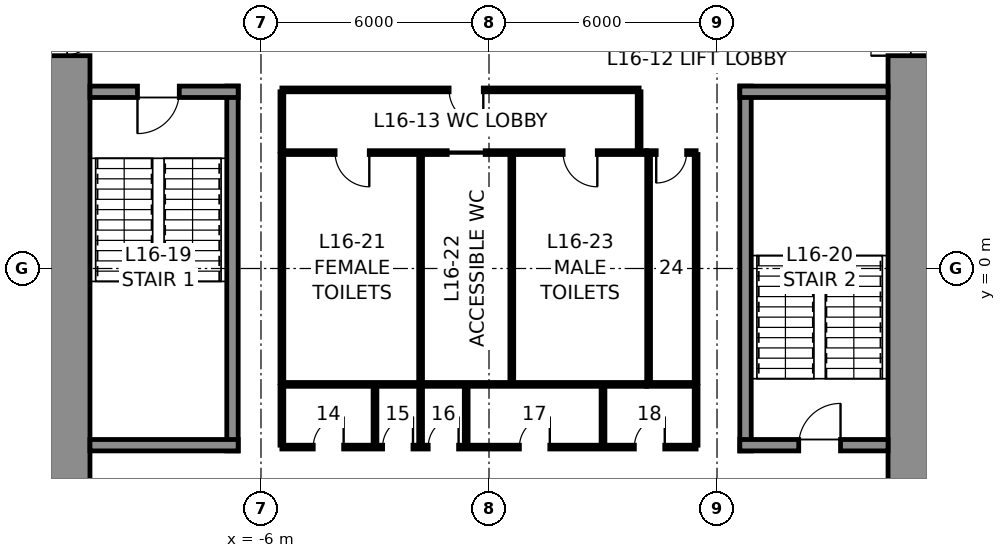
"""IFC4 building model, lengths in metres.
Left out: names, types, materials, properties, quantities, classifications, styles, units other than length and angle.
Written with IfcOpenShell. Run it as: python <this file> out.ifc"""

import sys

from ifc_helpers import new_model, si_unit, direction, frame, frame_2d, origin, place, context, subcontext, project, spatial, rectangle, extrude, element, fill, save


model = new_model("IFC4")
c1 = context("Model", 3, precision=1e-05, world=origin(), true_north=direction((0.0, 1.0)))
c2 = subcontext(c1, "Body", "Model", "MODEL_VIEW")
j1 = project(units=[si_unit("LENGTHUNIT", "METRE"), si_unit("PLANEANGLEUNIT", "RADIAN")], contexts=[c1])
p1 = place(None, origin())
s1 = spatial("IfcSite", under=j1, at=p1, CompositionType="ELEMENT")
p2 = place(p1, origin())
s2 = spatial("IfcBuilding", under=s1, at=p2, CompositionType="ELEMENT")
p3 = place(p2, frame((0.0, 0.0, 86.0)))
s3 = spatial("IfcBuildingStorey", under=s2, at=p3, CompositionType="ELEMENT", Elevation=86.0)
p4 = place(p3, frame((11.25, 10.5, 0.0), z_axis=(0.0, 0.0, 1.0), x_axis=(0.0, -1.0, 0.0)))
e1 = element("IfcWall", 1, at=p4, inside=s3, PredefinedType="SHEAR", context=c2, shape_type="SweptSolid", body=[
    extrude(rectangle(XDim=21.0, YDim=1.5, at=frame_2d((10.5, 0.0))), origin(), (0.0, 0.0, 1.0), 4.6),
])
p5 = place(p4, frame((3.7, 0.0, 0.0)))
e2 = element("IfcOpeningElement", 2, at=p5, cuts=e1, PredefinedType="OPENING", context=c2, shape_type="SweptSolid", body=[
    extrude(rectangle(XDim=1.2, YDim=2.3, at=frame_2d((0.6, 1.15))), frame((0.0, 0.76, 0.0), z_axis=(0.0, -1.0, 0.0), x_axis=(1.0, 0.0, 0.0)), (0.0, 0.0, 1.0), 1.52),
])
p6 = place(p4, frame((16.1, 0.0, 0.0)))
e3 = element("IfcOpeningElement", 3, at=p6, cuts=e1, PredefinedType="OPENING", context=c2, shape_type="SweptSolid", body=[
    extrude(rectangle(XDim=1.2, YDim=2.3, at=frame_2d((0.6, 1.15))), frame((0.0, 0.76, 0.0), z_axis=(0.0, -1.0, 0.0), x_axis=(1.0, 0.0, 0.0)), (0.0, 0.0, 1.0), 1.52),
])
p7 = place(p3, frame((-11.25, -10.5, 0.0), z_axis=(0.0, 0.0, 1.0), x_axis=(0.0, 1.0, 0.0)))
e4 = element("IfcWall", 4, at=p7, inside=s3, PredefinedType="SHEAR", context=c2, shape_type="SweptSolid", body=[
    extrude(rectangle(XDim=21.0, YDim=1.5, at=frame_2d((10.5, 0.0))), origin(), (0.0, 0.0, 1.0), 4.6),
])
p8 = place(p7, frame((16.1, 0.0, 0.0)))
e5 = element("IfcOpeningElement", 5, at=p8, cuts=e4, PredefinedType="OPENING", context=c2, shape_type="SweptSolid", body=[
    extrude(rectangle(XDim=1.2, YDim=2.3, at=frame_2d((0.6, 1.15))), frame((0.0, 0.76, 0.0), z_axis=(0.0, -1.0, 0.0), x_axis=(1.0, 0.0, 0.0)), (0.0, 0.0, 1.0), 1.52),
])
p9 = place(p7, frame((3.7, 0.0, 0.0)))
e6 = element("IfcOpeningElement", 6, at=p9, cuts=e4, PredefinedType="OPENING", context=c2, shape_type="SweptSolid", body=[
    extrude(rectangle(XDim=1.2, YDim=2.3, at=frame_2d((0.6, 1.15))), frame((0.0, 0.76, 0.0), z_axis=(0.0, -1.0, 0.0), x_axis=(1.0, 0.0, 0.0)), (0.0, 0.0, 1.0), 1.52),
])
p10 = place(p3, frame((-6.75, -4.8, 0.0), z_axis=(0.0, 0.0, 1.0), x_axis=(0.0, 1.0, 0.0)))
e7 = element("IfcWall", 7, at=p10, inside=s3, PredefinedType="SOLIDWALL", context=c2, shape_type="SweptSolid", body=[
    extrude(rectangle(XDim=9.6, YDim=0.3, at=frame_2d((4.8, 0.0))), origin(), (0.0, 0.0, 1.0), 4.35),
])
p11 = place(p3, frame((-10.5, 4.65, 0.0), z_axis=(0.0, 0.0, 1.0), x_axis=(1.0, 0.0, 0.0)))
e8 = element("IfcWall", 8, at=p11, inside=s3, PredefinedType="SOLIDWALL", context=c2, shape_type="SweptSolid", body=[
    extrude(rectangle(XDim=3.9, YDim=0.3, at=frame_2d((1.95, 0.0))), origin(), (0.0, 0.0, 1.0), 4.35),
])
p12 = place(p11, frame((1.25, 0.0, 0.0)))
e9 = element("IfcOpeningElement", 9, at=p12, cuts=e8, PredefinedType="OPENING", context=c2, shape_type="SweptSolid", body=[
    extrude(rectangle(XDim=1.1, YDim=2.3, at=frame_2d((0.55, 1.15))), frame((0.0, 0.16, 0.0), z_axis=(0.0, -1.0, 0.0), x_axis=(1.0, 0.0, 0.0)), (0.0, 0.0, 1.0), 0.32),
])
p13 = place(p3, frame((-6.6, -4.65, 0.0), z_axis=(0.0, 0.0, 1.0), x_axis=(-1.0, 0.0, 0.0)))
e10 = element("IfcWall", 10, at=p13, inside=s3, PredefinedType="SOLIDWALL", context=c2, shape_type="SweptSolid", body=[
    extrude(rectangle(XDim=3.9, YDim=0.3, at=frame_2d((1.95, 0.0))), origin(), (0.0, 0.0, 1.0), 4.35),
])
p14 = place(p3, frame((6.75, -4.8, 0.0), z_axis=(0.0, 0.0, 1.0), x_axis=(0.0, 1.0, 0.0)))
e11 = element("IfcWall", 11, at=p14, inside=s3, PredefinedType="SOLIDWALL", context=c2, shape_type="SweptSolid", body=[
    extrude(rectangle(XDim=9.6, YDim=0.3, at=frame_2d((4.8, 0.0))), origin(), (0.0, 0.0, 1.0), 4.35),
])
p15 = place(p3, frame((6.6, 4.65, 0.0), z_axis=(0.0, 0.0, 1.0), x_axis=(1.0, 0.0, 0.0)))
e12 = element("IfcWall", 12, at=p15, inside=s3, PredefinedType="SOLIDWALL", context=c2, shape_type="SweptSolid", body=[
    extrude(rectangle(XDim=3.9, YDim=0.3, at=frame_2d((1.95, 0.0))), origin(), (0.0, 0.0, 1.0), 4.35),
])
p16 = place(p3, frame((10.5, -4.65, 0.0), z_axis=(0.0, 0.0, 1.0), x_axis=(-1.0, 0.0, 0.0)))
e13 = element("IfcWall", 13, at=p16, inside=s3, PredefinedType="SOLIDWALL", context=c2, shape_type="SweptSolid", body=[
    extrude(rectangle(XDim=3.9, YDim=0.3, at=frame_2d((1.95, 0.0))), origin(), (0.0, 0.0, 1.0), 4.35),
])
p17 = place(p16, frame((1.25, 0.0, 0.0)))
e14 = element("IfcOpeningElement", 14, at=p17, cuts=e13, PredefinedType="OPENING", context=c2, shape_type="SweptSolid", body=[
    extrude(rectangle(XDim=1.1, YDim=2.3, at=frame_2d((0.55, 1.15))), frame((0.0, 0.16, 0.0), z_axis=(0.0, -1.0, 0.0), x_axis=(1.0, 0.0, 0.0)), (0.0, 0.0, 1.0), 0.32),
])
p18 = place(p3, frame((-5.45, 3.05, 0.0), z_axis=(0.0, 0.0, 1.0), x_axis=(1.0, 0.0, 0.0)))
e15 = element("IfcWall", 15, at=p18, inside=s3, PredefinedType="PARTITIONING", context=c2, shape_type="SweptSolid", body=[
    extrude(rectangle(XDim=9.6, YDim=0.1, at=frame_2d((4.8, 0.0))), origin(), (0.0, 0.0, 1.0), 4.35),
])
p19 = place(p18, frame((1.4, 0.0, 0.0)))
e16 = element("IfcOpeningElement", 16, at=p19, cuts=e15, PredefinedType="OPENING", context=c2, shape_type="SweptSolid", body=[
    extrude(rectangle(XDim=0.9, YDim=2.3, at=frame_2d((0.45, 1.15))), frame((0.0, 0.06, 0.0), z_axis=(0.0, -1.0, 0.0), x_axis=(1.0, 0.0, 0.0)), (0.0, 0.0, 1.0), 0.12),
])
p20 = place(p18, frame((4.35, 0.0, 0.0)))
e17 = element("IfcOpeningElement", 17, at=p20, cuts=e15, PredefinedType="OPENING", context=c2, shape_type="SweptSolid", body=[
    extrude(rectangle(XDim=1.0, YDim=2.3, at=frame_2d((0.5, 1.15))), frame((0.0, 0.06, 0.0), z_axis=(0.0, -1.0, 0.0), x_axis=(1.0, 0.0, 0.0)), (0.0, 0.0, 1.0), 0.12),
])
p21 = place(p18, frame((7.4, 0.0, 0.0)))
e18 = element("IfcOpeningElement", 18, at=p21, cuts=e15, PredefinedType="OPENING", context=c2, shape_type="SweptSolid", body=[
    extrude(rectangle(XDim=0.9, YDim=2.3, at=frame_2d((0.45, 1.15))), frame((0.0, 0.06, 0.0), z_axis=(0.0, -1.0, 0.0), x_axis=(1.0, 0.0, 0.0)), (0.0, 0.0, 1.0), 0.12),
])
p22 = place(p3, frame((4.15, 3.05, 0.0), z_axis=(0.0, 0.0, 1.0), x_axis=(1.0, 0.0, 0.0)))
e19 = element("IfcWall", 19, at=p22, inside=s3, PredefinedType="PARTITIONING", context=c2, shape_type="SweptSolid", body=[
    extrude(rectangle(XDim=1.3, YDim=0.1, at=frame_2d((0.65, 0.0))), origin(), (0.0, 0.0, 1.0), 4.35),
])
p23 = place(p22, frame((0.25, 0.0, 0.0)))
e20 = element("IfcOpeningElement", 20, at=p23, cuts=e19, PredefinedType="OPENING", context=c2, shape_type="SweptSolid", body=[
    extrude(rectangle(XDim=0.8, YDim=2.3, at=frame_2d((0.4, 1.15))), frame((0.0, 0.06, 0.0), z_axis=(0.0, -1.0, 0.0), x_axis=(1.0, 0.0, 0.0)), (0.0, 0.0, 1.0), 0.12),
])
p24 = place(p3, frame((4.15, -3.05, 0.0), z_axis=(0.0, 0.0, 1.0), x_axis=(-1.0, 0.0, 0.0)))
e21 = element("IfcWall", 21, at=p24, inside=s3, PredefinedType="PARTITIONING", context=c2, shape_type="SweptSolid", body=[
    extrude(rectangle(XDim=9.6, YDim=0.1, at=frame_2d((4.8, 0.0))), origin(), (0.0, 0.0, 1.0), 4.35),
])
p25 = place(p3, frame((5.45, -3.05, 0.0), z_axis=(0.0, 0.0, 1.0), x_axis=(-1.0, 0.0, 0.0)))
e22 = element("IfcWall", 22, at=p25, inside=s3, PredefinedType="PARTITIONING", context=c2, shape_type="SweptSolid", body=[
    extrude(rectangle(XDim=1.3, YDim=0.1, at=frame_2d((0.65, 0.0))), origin(), (0.0, 0.0, 1.0), 4.35),
])
for number, where, z_axis, x_axis in (
    (23, (5.45, 3.0, 0.0), (0.0, 0.0, 1.0), (0.0, -1.0, 0.0)),
    (24, (-5.45, -3.0, 0.0), (0.0, 0.0, 1.0), (0.0, 1.0, 0.0)),
    (25, (-1.8, -3.0, 0.0), (0.0, 0.0, 1.0), (0.0, 1.0, 0.0)),
    (26, (0.6, -3.0, 0.0), (0.0, 0.0, 1.0), (0.0, 1.0, 0.0)),
    (27, (4.2, -3.0, 0.0), (0.0, 0.0, 1.0), (0.0, 1.0, 0.0)),
):
    element("IfcWall", number, at=place(p3, frame(where, z_axis=z_axis, x_axis=x_axis)), inside=s3, PredefinedType="PARTITIONING", context=c2, shape_type="SweptSolid", body=[
        extrude(rectangle(XDim=6.0, YDim=0.1, at=frame_2d((3.0, 0.0))), origin(), (0.0, 0.0, 1.0), 4.35),
    ])
p26 = place(p3, frame((-5.45, 4.7, 0.0), z_axis=(0.0, 0.0, 1.0), x_axis=(1.0, 0.0, 0.0)))
e28 = element("IfcWall", 28, at=p26, inside=s3, PredefinedType="PARTITIONING", context=c2, shape_type="SweptSolid", body=[
    extrude(rectangle(XDim=9.4, YDim=0.1, at=frame_2d((4.7, 0.0))), origin(), (0.0, 0.0, 1.0), 4.35),
])
p27 = place(p26, frame((4.4, 0.0, 0.0)))
e29 = element("IfcOpeningElement", 29, at=p27, cuts=e28, PredefinedType="OPENING", context=c2, shape_type="SweptSolid", body=[
    extrude(rectangle(XDim=0.9, YDim=2.3, at=frame_2d((0.45, 1.15))), frame((0.0, 0.06, 0.0), z_axis=(0.0, -1.0, 0.0), x_axis=(1.0, 0.0, 0.0)), (0.0, 0.0, 1.0), 0.12),
])
for number, where, z_axis, x_axis in (
    (30, (-5.45, 3.1, 0.0), (0.0, 0.0, 1.0), (0.0, 1.0, 0.0)),
    (31, (3.95, 3.1, 0.0), (0.0, 0.0, 1.0), (0.0, 1.0, 0.0)),
):
    element("IfcWall", number, at=place(p3, frame(where, z_axis=z_axis, x_axis=x_axis)), inside=s3, PredefinedType="PARTITIONING", context=c2, shape_type="SweptSolid", body=[
        extrude(rectangle(XDim=1.55, YDim=0.1, at=frame_2d((0.775, 0.0))), origin(), (0.0, 0.0, 1.0), 4.35),
    ])
p28 = place(p3, frame((5.45, -4.7, 0.0), z_axis=(0.0, 0.0, 1.0), x_axis=(-1.0, 0.0, 0.0)))
e32 = element("IfcWall", 32, at=p28, inside=s3, PredefinedType="PARTITIONING", context=c2, shape_type="SweptSolid", body=[
    extrude(rectangle(XDim=10.9, YDim=0.1, at=frame_2d((5.45, 0.0))), origin(), (0.0, 0.0, 1.0), 4.35),
])
p29 = place(p28, frame((9.275, 0.0, 0.0)))
e33 = element("IfcOpeningElement", 33, at=p29, cuts=e32, PredefinedType="OPENING", context=c2, shape_type="SweptSolid", body=[
    extrude(rectangle(XDim=0.8, YDim=2.3, at=frame_2d((0.4, 1.15))), frame((0.0, 0.06, 0.0), z_axis=(0.0, -1.0, 0.0), x_axis=(1.0, 0.0, 0.0)), (0.0, 0.0, 1.0), 0.12),
])
p30 = place(p28, frame((7.45, 0.0, 0.0)))
e34 = element("IfcOpeningElement", 34, at=p30, cuts=e32, PredefinedType="OPENING", context=c2, shape_type="SweptSolid", body=[
    extrude(rectangle(XDim=0.8, YDim=2.3, at=frame_2d((0.4, 1.15))), frame((0.0, 0.06, 0.0), z_axis=(0.0, -1.0, 0.0), x_axis=(1.0, 0.0, 0.0)), (0.0, 0.0, 1.0), 0.12),
])
p31 = place(p28, frame((6.25, 0.0, 0.0)))
e35 = element("IfcOpeningElement", 35, at=p31, cuts=e32, PredefinedType="OPENING", context=c2, shape_type="SweptSolid", body=[
    extrude(rectangle(XDim=0.8, YDim=2.3, at=frame_2d((0.4, 1.15))), frame((0.0, 0.06, 0.0), z_axis=(0.0, -1.0, 0.0), x_axis=(1.0, 0.0, 0.0)), (0.0, 0.0, 1.0), 0.12),
])
p32 = place(p28, frame((3.85, 0.0, 0.0)))
e36 = element("IfcOpeningElement", 36, at=p32, cuts=e32, PredefinedType="OPENING", context=c2, shape_type="SweptSolid", body=[
    extrude(rectangle(XDim=0.8, YDim=2.3, at=frame_2d((0.4, 1.15))), frame((0.0, 0.06, 0.0), z_axis=(0.0, -1.0, 0.0), x_axis=(1.0, 0.0, 0.0)), (0.0, 0.0, 1.0), 0.12),
])
p33 = place(p28, frame((0.825, 0.0, 0.0)))
e37 = element("IfcOpeningElement", 37, at=p33, cuts=e32, PredefinedType="OPENING", context=c2, shape_type="SweptSolid", body=[
    extrude(rectangle(XDim=0.8, YDim=2.3, at=frame_2d((0.4, 1.15))), frame((0.0, 0.06, 0.0), z_axis=(0.0, -1.0, 0.0), x_axis=(1.0, 0.0, 0.0)), (0.0, 0.0, 1.0), 0.12),
])
for number, where, z_axis, x_axis in (
    (38, (-5.45, -3.1, 0.0), (0.0, 0.0, 1.0), (0.0, -1.0, 0.0)),
    (39, (5.45, -3.1, 0.0), (0.0, 0.0, 1.0), (0.0, -1.0, 0.0)),
    (40, (-3.0, -3.1, 0.0), (0.0, 0.0, 1.0), (0.0, -1.0, 0.0)),
    (41, (-1.8, -3.1, 0.0), (0.0, 0.0, 1.0), (0.0, -1.0, 0.0)),
    (42, (-0.6, -3.1, 0.0), (0.0, 0.0, 1.0), (0.0, -1.0, 0.0)),
    (43, (3.0, -3.1, 0.0), (0.0, 0.0, 1.0), (0.0, -1.0, 0.0)),
):
    element("IfcWall", number, at=place(p3, frame(where, z_axis=z_axis, x_axis=x_axis)), inside=s3, PredefinedType="PARTITIONING", context=c2, shape_type="SweptSolid", body=[
        extrude(rectangle(XDim=1.55, YDim=0.1, at=frame_2d((0.775, 0.0))), origin(), (0.0, 0.0, 1.0), 4.35),
    ])
p34 = place(p12, frame((1.1, 0.0, 0.0), z_axis=(0.0, 0.0, 1.0), x_axis=(-1.0, 0.0, 0.0)))
e44 = element("IfcDoor", 44, at=p34, inside=s3, OperationType="SINGLE_SWING_RIGHT", PredefinedType="DOOR", context=c2, shape_type="SweptSolid", body=[
    extrude(rectangle(XDim=1.1, YDim=2.3, at=frame_2d((0.55, 1.15))), frame((0.0, 0.025, 0.0), z_axis=(0.0, -1.0, 0.0), x_axis=(1.0, 0.0, 0.0)), (0.0, 0.0, 1.0), 0.05),
])
fill(e9, e44)
p35 = place(p17, frame((1.1, 0.0, 0.0), z_axis=(0.0, 0.0, 1.0), x_axis=(-1.0, 0.0, 0.0)))
e45 = element("IfcDoor", 45, at=p35, inside=s3, OperationType="SINGLE_SWING_RIGHT", PredefinedType="DOOR", context=c2, shape_type="SweptSolid", body=[
    extrude(rectangle(XDim=1.1, YDim=2.3, at=frame_2d((0.55, 1.15))), frame((0.0, 0.025, 0.0), z_axis=(0.0, -1.0, 0.0), x_axis=(1.0, 0.0, 0.0)), (0.0, 0.0, 1.0), 0.05),
])
fill(e14, e45)
p36 = place(p19, frame((0.9, 0.0, 0.0), z_axis=(0.0, 0.0, 1.0), x_axis=(-1.0, 0.0, 0.0)))
e46 = element("IfcDoor", 46, at=p36, inside=s3, OperationType="SINGLE_SWING_LEFT", PredefinedType="DOOR", context=c2, shape_type="SweptSolid", body=[
    extrude(rectangle(XDim=0.9, YDim=2.3, at=frame_2d((0.45, 1.15))), frame((0.0, 0.025, 0.0), z_axis=(0.0, -1.0, 0.0), x_axis=(1.0, 0.0, 0.0)), (0.0, 0.0, 1.0), 0.05),
])
fill(e16, e46)
p37 = place(p20, frame((1.0, 0.0, 0.0), z_axis=(0.0, 0.0, 1.0), x_axis=(-1.0, 0.0, 0.0)))
e47 = element("IfcDoor", 47, at=p37, inside=s3, OperationType="SLIDING_TO_LEFT", PredefinedType="DOOR", context=c2, shape_type="SweptSolid", body=[
    extrude(rectangle(XDim=1.0, YDim=2.3, at=frame_2d((0.5, 1.15))), frame((0.0, 0.025, 0.0), z_axis=(0.0, -1.0, 0.0), x_axis=(1.0, 0.0, 0.0)), (0.0, 0.0, 1.0), 0.05),
])
fill(e17, e47)
p38 = place(p21, frame((0.9, 0.0, 0.0), z_axis=(0.0, 0.0, 1.0), x_axis=(-1.0, 0.0, 0.0)))
e48 = element("IfcDoor", 48, at=p38, inside=s3, OperationType="SINGLE_SWING_LEFT", PredefinedType="DOOR", context=c2, shape_type="SweptSolid", body=[
    extrude(rectangle(XDim=0.9, YDim=2.3, at=frame_2d((0.45, 1.15))), frame((0.0, 0.025, 0.0), z_axis=(0.0, -1.0, 0.0), x_axis=(1.0, 0.0, 0.0)), (0.0, 0.0, 1.0), 0.05),
])
fill(e18, e48)
p39 = place(p23, frame((0.8, 0.0, 0.0), z_axis=(0.0, 0.0, 1.0), x_axis=(-1.0, 0.0, 0.0)))
e49 = element("IfcDoor", 49, at=p39, inside=s3, OperationType="SINGLE_SWING_RIGHT", PredefinedType="DOOR", context=c2, shape_type="SweptSolid", body=[
    extrude(rectangle(XDim=0.8, YDim=2.3, at=frame_2d((0.4, 1.15))), frame((0.0, 0.025, 0.0), z_axis=(0.0, -1.0, 0.0), x_axis=(1.0, 0.0, 0.0)), (0.0, 0.0, 1.0), 0.05),
])
fill(e20, e49)
p40 = place(p27, frame((0.9, 0.0, 0.0), z_axis=(0.0, 0.0, 1.0), x_axis=(-1.0, 0.0, 0.0)))
e50 = element("IfcDoor", 50, at=p40, inside=s3, OperationType="SINGLE_SWING_LEFT", PredefinedType="DOOR", context=c2, shape_type="SweptSolid", body=[
    extrude(rectangle(XDim=0.9, YDim=2.3, at=frame_2d((0.45, 1.15))), frame((0.0, 0.025, 0.0), z_axis=(0.0, -1.0, 0.0), x_axis=(1.0, 0.0, 0.0)), (0.0, 0.0, 1.0), 0.05),
])
fill(e29, e50)
p41 = place(p29, frame((0.8, 0.0, 0.0), z_axis=(0.0, 0.0, 1.0), x_axis=(-1.0, 0.0, 0.0)))
e51 = element("IfcDoor", 51, at=p41, inside=s3, OperationType="SINGLE_SWING_RIGHT", PredefinedType="DOOR", context=c2, shape_type="SweptSolid", body=[
    extrude(rectangle(XDim=0.8, YDim=2.3, at=frame_2d((0.4, 1.15))), frame((0.0, 0.025, 0.0), z_axis=(0.0, -1.0, 0.0), x_axis=(1.0, 0.0, 0.0)), (0.0, 0.0, 1.0), 0.05),
])
fill(e33, e51)
p42 = place(p30, frame((0.8, 0.0, 0.0), z_axis=(0.0, 0.0, 1.0), x_axis=(-1.0, 0.0, 0.0)))
e52 = element("IfcDoor", 52, at=p42, inside=s3, OperationType="SINGLE_SWING_RIGHT", PredefinedType="DOOR", context=c2, shape_type="SweptSolid", body=[
    extrude(rectangle(XDim=0.8, YDim=2.3, at=frame_2d((0.4, 1.15))), frame((0.0, 0.025, 0.0), z_axis=(0.0, -1.0, 0.0), x_axis=(1.0, 0.0, 0.0)), (0.0, 0.0, 1.0), 0.05),
])
fill(e34, e52)
p43 = place(p31, frame((0.8, 0.0, 0.0), z_axis=(0.0, 0.0, 1.0), x_axis=(-1.0, 0.0, 0.0)))
e53 = element("IfcDoor", 53, at=p43, inside=s3, OperationType="SINGLE_SWING_RIGHT", PredefinedType="DOOR", context=c2, shape_type="SweptSolid", body=[
    extrude(rectangle(XDim=0.8, YDim=2.3, at=frame_2d((0.4, 1.15))), frame((0.0, 0.025, 0.0), z_axis=(0.0, -1.0, 0.0), x_axis=(1.0, 0.0, 0.0)), (0.0, 0.0, 1.0), 0.05),
])
fill(e35, e53)
p44 = place(p32, frame((0.8, 0.0, 0.0), z_axis=(0.0, 0.0, 1.0), x_axis=(-1.0, 0.0, 0.0)))
e54 = element("IfcDoor", 54, at=p44, inside=s3, OperationType="SINGLE_SWING_RIGHT", PredefinedType="DOOR", context=c2, shape_type="SweptSolid", body=[
    extrude(rectangle(XDim=0.8, YDim=2.3, at=frame_2d((0.4, 1.15))), frame((0.0, 0.025, 0.0), z_axis=(0.0, -1.0, 0.0), x_axis=(1.0, 0.0, 0.0)), (0.0, 0.0, 1.0), 0.05),
])
fill(e36, e54)
p45 = place(p33, frame((0.8, 0.0, 0.0), z_axis=(0.0, 0.0, 1.0), x_axis=(-1.0, 0.0, 0.0)))
e55 = element("IfcDoor", 55, at=p45, inside=s3, OperationType="SINGLE_SWING_RIGHT", PredefinedType="DOOR", context=c2, shape_type="SweptSolid", body=[
    extrude(rectangle(XDim=0.8, YDim=2.3, at=frame_2d((0.4, 1.15))), frame((0.0, 0.025, 0.0), z_axis=(0.0, -1.0, 0.0), x_axis=(1.0, 0.0, 0.0)), (0.0, 0.0, 1.0), 0.05),
])
fill(e37, e55)
p46 = place(p8, frame((1.2, 0.0, 0.0), z_axis=(0.0, 0.0, 1.0), x_axis=(-1.0, 0.0, 0.0)))
e56 = element("IfcDoor", 56, at=p46, inside=s3, OperationType="SINGLE_SWING_LEFT", PredefinedType="DOOR", context=c2, shape_type="SweptSolid", body=[
    extrude(rectangle(XDim=1.2, YDim=2.3, at=frame_2d((0.6, 1.15))), frame((0.0, 0.025, 0.0), z_axis=(0.0, -1.0, 0.0), x_axis=(1.0, 0.0, 0.0)), (0.0, 0.0, 1.0), 0.05),
])
fill(e5, e56)
p47 = place(p5, frame((1.2, 0.0, 0.0), z_axis=(0.0, 0.0, 1.0), x_axis=(-1.0, 0.0, 0.0)))
e57 = element("IfcDoor", 57, at=p47, inside=s3, OperationType="SINGLE_SWING_LEFT", PredefinedType="DOOR", context=c2, shape_type="SweptSolid", body=[
    extrude(rectangle(XDim=1.2, YDim=2.3, at=frame_2d((0.6, 1.15))), frame((0.0, 0.025, 0.0), z_axis=(0.0, -1.0, 0.0), x_axis=(1.0, 0.0, 0.0)), (0.0, 0.0, 1.0), 0.05),
])
fill(e2, e57)
save(model, sys.argv[1])
